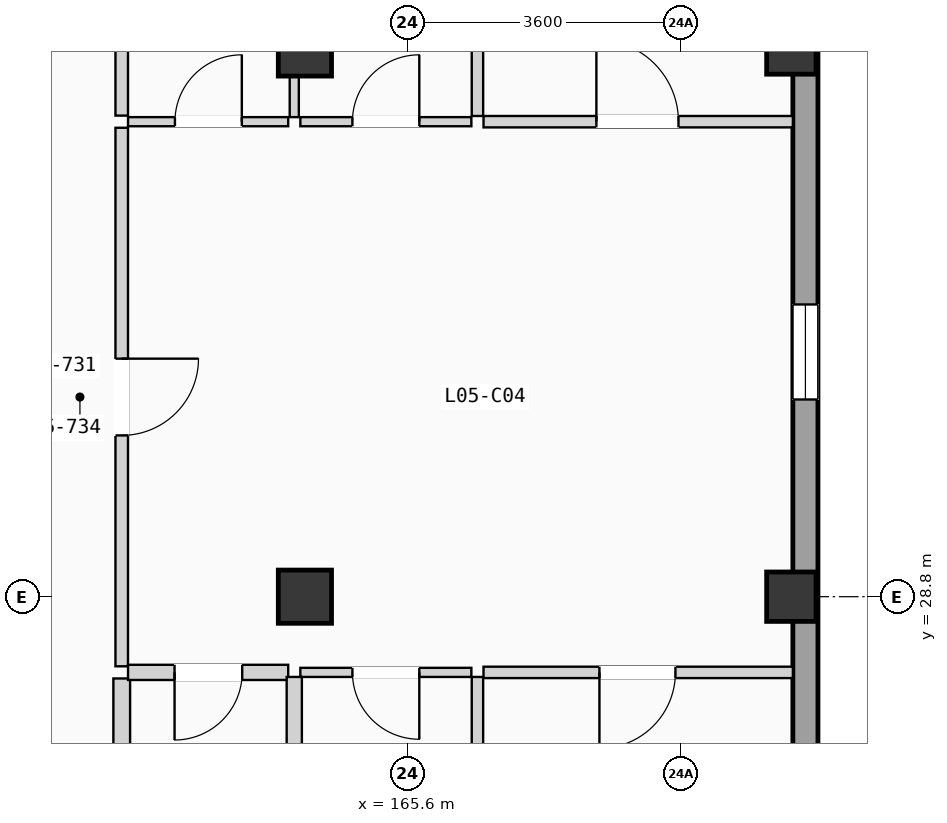
"""IFC4 building model, lengths in metres.
Left out: names, types, materials, properties, quantities, classifications, styles, units other than length and angle.
Written with IfcOpenShell. Run it as: python <this file> out.ifc"""

import sys

from ifc_helpers import new_model, si_unit, direction, frame, frame_2d, origin, origin_2d, place, context, subcontext, project, spatial, rectangle, extrude, element, fill, save


model = new_model("IFC4")
c1 = context("Model", 3, precision=1e-05, world=origin(), true_north=direction((0.0, 1.0)))
c2 = subcontext(c1, "Body", "Model", "MODEL_VIEW")
j1 = project(units=[si_unit("LENGTHUNIT", "METRE"), si_unit("PLANEANGLEUNIT", "RADIAN")], contexts=[c1])
p1 = place(None, origin())
s1 = spatial("IfcSite", under=j1, at=p1, CompositionType="ELEMENT")
p2 = place(p1, origin())
s2 = spatial("IfcBuilding", under=s1, at=p2, CompositionType="ELEMENT")
p3 = place(p2, frame((0.0, 0.0, 18.375)))
s3 = spatial("IfcBuildingStorey", under=s2, at=p3, CompositionType="ELEMENT", Elevation=18.375)
for number, where, z_axis, x_axis in (
    (1, (164.25, 28.8, 0.0), (0.0, 0.0, 1.0), (1.0, 0.0, 0.0)),
    (2, (164.25, 36.0, 0.0), (0.0, 0.0, 1.0), (1.0, 0.0, 0.0)),
):
    element("IfcColumn", number, at=place(p3, frame(where, z_axis=z_axis, x_axis=x_axis)), inside=s3, PredefinedType="COLUMN", context=c2, shape_type="SweptSolid", body=[
        extrude(rectangle(XDim=0.7, YDim=0.7, at=origin_2d()), origin(), (0.0, 0.0, 1.0), 3.15),
    ])
for number, where, z_axis, x_axis in (
    (3, (170.65, 28.8, 0.0), (0.0, 0.0, 1.0), (1.0, 0.0, 0.0)),
    (4, (170.65, 36.0, 0.0), (0.0, 0.0, 1.0), (1.0, 0.0, 0.0)),
):
    element("IfcColumn", number, at=place(p3, frame(where, z_axis=z_axis, x_axis=x_axis)), inside=s3, PredefinedType="COLUMN", context=c2, shape_type="SweptSolid", body=[
        extrude(rectangle(XDim=0.65, YDim=0.65, at=origin_2d()), origin(), (0.0, 0.0, 1.0), 3.15),
    ])
p4 = place(p3, frame((170.835, 0.33, 0.0), z_axis=(0.0, 0.0, 1.0), x_axis=(0.0, 1.0, 0.0)))
e5 = element("IfcWall", 5, at=p4, inside=s3, PredefinedType="SOLIDWALL", context=c2, shape_type="SweptSolid", body=[
    extrude(rectangle(XDim=49.74, YDim=0.33, at=frame_2d((24.87, 0.0))), origin(), (0.0, 0.0, 1.0), 2.89),
])
p5 = place(p4, frame((9.91, 0.0, 0.855)))
e6 = element("IfcOpeningElement", 6, at=p5, cuts=e5, PredefinedType="OPENING", context=c2, shape_type="SweptSolid", body=[
    extrude(rectangle(XDim=1.25, YDim=1.35, at=frame_2d((0.625, 0.675))), frame((0.0, 0.175, 0.0), z_axis=(0.0, -1.0, 0.0), x_axis=(1.0, 0.0, 0.0)), (0.0, 0.0, 1.0), 0.35),
])
p6 = place(p4, frame((16.823, 0.0, 0.705)))
e7 = element("IfcOpeningElement", 7, at=p6, cuts=e5, PredefinedType="OPENING", context=c2, shape_type="SweptSolid", body=[
    extrude(rectangle(XDim=1.25, YDim=1.5, at=frame_2d((0.625, 0.75))), frame((0.0, 0.175, 0.0), z_axis=(0.0, -1.0, 0.0), x_axis=(1.0, 0.0, 0.0)), (0.0, 0.0, 1.0), 0.35),
])
p7 = place(p4, frame((31.065, 0.0, 0.555)))
e8 = element("IfcOpeningElement", 8, at=p7, cuts=e5, PredefinedType="OPENING", context=c2, shape_type="SweptSolid", body=[
    extrude(rectangle(XDim=1.25, YDim=1.65, at=frame_2d((0.625, 0.825))), frame((0.0, 0.175, 0.0), z_axis=(0.0, -1.0, 0.0), x_axis=(1.0, 0.0, 0.0)), (0.0, 0.0, 1.0), 0.35),
])
p8 = place(p4, frame((23.992, 0.0, 0.85)))
e9 = element("IfcOpeningElement", 9, at=p8, cuts=e5, PredefinedType="OPENING", context=c2, shape_type="SweptSolid", body=[
    extrude(rectangle(XDim=0.95, YDim=1.2, at=frame_2d((0.475, 0.6))), frame((0.0, 0.175, 0.0), z_axis=(0.0, -1.0, 0.0), x_axis=(1.0, 0.0, 0.0)), (0.0, 0.0, 1.0), 0.35),
])
p9 = place(p4, frame((38.53, 0.0, 0.9)))
e10 = element("IfcOpeningElement", 10, at=p9, cuts=e5, PredefinedType="OPENING", context=c2, shape_type="SweptSolid", body=[
    extrude(rectangle(XDim=1.35, YDim=1.2, at=frame_2d((0.675, 0.6))), frame((0.0, 0.175, 0.0), z_axis=(0.0, -1.0, 0.0), x_axis=(1.0, 0.0, 0.0)), (0.0, 0.0, 1.0), 0.35),
])
p10 = place(p3, frame((161.84, 27.884, 0.0), z_axis=(0.0, 0.0, 1.0), x_axis=(0.0, 1.0, 0.0)))
e11 = element("IfcWall", 11, at=p10, inside=s3, PredefinedType="PARTITIONING", context=c2, shape_type="SweptSolid", body=[
    extrude(rectangle(XDim=7.086, YDim=0.165, at=frame_2d((3.543, 0.0))), origin(), (0.0, 0.0, 1.0), 2.87),
])
p11 = place(p10, frame((3.038, 0.0, 0.0)))
e12 = element("IfcOpeningElement", 12, at=p11, cuts=e11, PredefinedType="OPENING", context=c2, shape_type="SweptSolid", body=[
    extrude(rectangle(XDim=1.01, YDim=2.11, at=frame_2d((0.505, 1.055))), frame((0.0, 0.093, 0.0), z_axis=(0.0, -1.0, 0.0), x_axis=(1.0, 0.0, 0.0)), (0.0, 0.0, 1.0), 0.185),
])
p12 = place(p3, frame((161.84, 21.066, 0.0), z_axis=(0.0, 0.0, 1.0), x_axis=(0.0, 1.0, 0.0)))
e13 = element("IfcWall", 13, at=p12, inside=s3, PredefinedType="PLUMBINGWALL", context=c2, shape_type="SweptSolid", body=[
    extrude(rectangle(XDim=6.658, YDim=0.22, at=frame_2d((3.329, 0.0))), origin(), (0.0, 0.0, 1.0), 2.87),
])
p13 = place(p3, frame((161.84, 35.13, 0.0), z_axis=(0.0, 0.0, 1.0), x_axis=(0.0, 1.0, 0.0)))
e14 = element("IfcWall", 14, at=p13, inside=s3, PredefinedType="PARTITIONING", context=c2, shape_type="SweptSolid", body=[
    extrude(rectangle(XDim=7.67, YDim=0.165, at=frame_2d((3.835, 0.0))), origin(), (0.0, 0.0, 1.0), 2.87),
])
p14 = place(p3, frame((161.923, 27.804, 0.0), z_axis=(0.0, 0.0, 1.0), x_axis=(1.0, 0.0, 0.0)))
e15 = element("IfcWall", 15, at=p14, inside=s3, PredefinedType="PLUMBINGWALL", context=c2, shape_type="SweptSolid", body=[
    extrude(rectangle(XDim=2.107, YDim=0.2, at=frame_2d((1.053, 0.0))), origin(), (0.0, 0.0, 1.0), 2.87),
])
p15 = place(p14, frame((0.612, 0.0, 0.0)))
e16 = element("IfcOpeningElement", 16, at=p15, cuts=e15, PredefinedType="OPENING", context=c2, shape_type="SweptSolid", body=[
    extrude(rectangle(XDim=0.89, YDim=2.03, at=frame_2d((0.445, 1.015))), frame((0.0, 0.11, 0.0), z_axis=(0.0, -1.0, 0.0), x_axis=(1.0, 0.0, 0.0)), (0.0, 0.0, 1.0), 0.22),
])
p16 = place(p3, frame((161.923, 35.05, 0.0), z_axis=(0.0, 0.0, 1.0), x_axis=(1.0, 0.0, 0.0)))
e17 = element("IfcWall", 17, at=p16, inside=s3, PredefinedType="PARTITIONING", context=c2, shape_type="SweptSolid", body=[
    extrude(rectangle(XDim=2.107, YDim=0.12, at=frame_2d((1.053, 0.0))), origin(), (0.0, 0.0, 1.0), 2.87),
])
p17 = place(p16, frame((0.617, 0.0, 0.0)))
e18 = element("IfcOpeningElement", 18, at=p17, cuts=e17, PredefinedType="OPENING", context=c2, shape_type="SweptSolid", body=[
    extrude(rectangle(XDim=0.88, YDim=2.02, at=frame_2d((0.44, 1.01))), frame((0.0, 0.07, 0.0), z_axis=(0.0, -1.0, 0.0), x_axis=(1.0, 0.0, 0.0)), (0.0, 0.0, 1.0), 0.14),
])
p18 = place(p3, frame((166.6, 27.804, 0.0), z_axis=(0.0, 0.0, 1.0), x_axis=(1.0, 0.0, 0.0)))
e19 = element("IfcWall", 19, at=p18, inside=s3, PredefinedType="PARTITIONING", context=c2, shape_type="SweptSolid", body=[
    extrude(rectangle(XDim=4.07, YDim=0.15, at=frame_2d((2.035, 0.0))), origin(), (0.0, 0.0, 1.0), 2.87),
])
p19 = place(p18, frame((1.525, 0.0, 0.0)))
e20 = element("IfcOpeningElement", 20, at=p19, cuts=e19, PredefinedType="OPENING", context=c2, shape_type="SweptSolid", body=[
    extrude(rectangle(XDim=1.0, YDim=2.06, at=frame_2d((0.5, 1.03))), frame((0.0, 0.085, 0.0), z_axis=(0.0, -1.0, 0.0), x_axis=(1.0, 0.0, 0.0)), (0.0, 0.0, 1.0), 0.17),
])
p20 = place(p3, frame((164.19, 27.804, 0.0), z_axis=(0.0, 0.0, 1.0), x_axis=(1.0, 0.0, 0.0)))
e21 = element("IfcWall", 21, at=p20, inside=s3, PredefinedType="PARTITIONING", context=c2, shape_type="SweptSolid", body=[
    extrude(rectangle(XDim=2.25, YDim=0.12, at=frame_2d((1.125, 0.0))), origin(), (0.0, 0.0, 1.0), 2.87),
])
p21 = place(p20, frame((0.685, 0.0, 0.0)))
e22 = element("IfcOpeningElement", 22, at=p21, cuts=e21, PredefinedType="OPENING", context=c2, shape_type="SweptSolid", body=[
    extrude(rectangle(XDim=0.88, YDim=2.02, at=frame_2d((0.44, 1.01))), frame((0.0, 0.07, 0.0), z_axis=(0.0, -1.0, 0.0), x_axis=(1.0, 0.0, 0.0)), (0.0, 0.0, 1.0), 0.14),
])
p22 = place(p3, frame((166.6, 35.05, 0.0), z_axis=(0.0, 0.0, 1.0), x_axis=(1.0, 0.0, 0.0)))
e23 = element("IfcWall", 23, at=p22, inside=s3, PredefinedType="PARTITIONING", context=c2, shape_type="SweptSolid", body=[
    extrude(rectangle(XDim=4.07, YDim=0.15, at=frame_2d((2.035, 0.0))), origin(), (0.0, 0.0, 1.0), 2.87),
])
p23 = place(p22, frame((1.485, 0.0, 0.0)))
e24 = element("IfcOpeningElement", 24, at=p23, cuts=e23, PredefinedType="OPENING", context=c2, shape_type="SweptSolid", body=[
    extrude(rectangle(XDim=1.08, YDim=2.1, at=frame_2d((0.54, 1.05))), frame((0.0, 0.085, 0.0), z_axis=(0.0, -1.0, 0.0), x_axis=(1.0, 0.0, 0.0)), (0.0, 0.0, 1.0), 0.17),
])
p24 = place(p3, frame((164.19, 35.05, 0.0), z_axis=(0.0, 0.0, 1.0), x_axis=(1.0, 0.0, 0.0)))
e25 = element("IfcWall", 25, at=p24, inside=s3, PredefinedType="PARTITIONING", context=c2, shape_type="SweptSolid", body=[
    extrude(rectangle(XDim=2.25, YDim=0.12, at=frame_2d((1.125, 0.0))), origin(), (0.0, 0.0, 1.0), 2.87),
])
p25 = place(p24, frame((0.685, 0.0, 0.0)))
e26 = element("IfcOpeningElement", 26, at=p25, cuts=e25, PredefinedType="OPENING", context=c2, shape_type="SweptSolid", body=[
    extrude(rectangle(XDim=0.88, YDim=2.02, at=frame_2d((0.44, 1.01))), frame((0.0, 0.07, 0.0), z_axis=(0.0, -1.0, 0.0), x_axis=(1.0, 0.0, 0.0)), (0.0, 0.0, 1.0), 0.14),
])
p26 = place(p3, frame((164.11, 21.066, 0.0), z_axis=(0.0, 0.0, 1.0), x_axis=(0.0, 1.0, 0.0)))
e27 = element("IfcWall", 27, at=p26, inside=s3, PredefinedType="PLUMBINGWALL", context=c2, shape_type="SweptSolid", body=[
    extrude(rectangle(XDim=6.678, YDim=0.2, at=frame_2d((3.339, 0.0))), origin(), (0.0, 0.0, 1.0), 2.87),
])
p27 = place(p26, frame((2.904, 0.0, 0.0)))
e28 = element("IfcOpeningElement", 28, at=p27, cuts=e27, PredefinedType="OPENING", context=c2, shape_type="SweptSolid", body=[
    extrude(rectangle(XDim=0.85, YDim=2.01, at=frame_2d((0.425, 1.005))), frame((0.0, 0.11, 0.0), z_axis=(0.0, -1.0, 0.0), x_axis=(1.0, 0.0, 0.0)), (0.0, 0.0, 1.0), 0.22),
])
p28 = place(p3, frame((164.11, 35.11, 0.0), z_axis=(0.0, 0.0, 1.0), x_axis=(0.0, 1.0, 0.0)))
e29 = element("IfcWall", 29, at=p28, inside=s3, PredefinedType="PARTITIONING", context=c2, shape_type="SweptSolid", body=[
    extrude(rectangle(XDim=7.69, YDim=0.12, at=frame_2d((3.845, 0.0))), origin(), (0.0, 0.0, 1.0), 2.87),
])
p29 = place(p3, frame((166.52, 21.066, 0.0), z_axis=(0.0, 0.0, 1.0), x_axis=(0.0, 1.0, 0.0)))
e30 = element("IfcWall", 30, at=p29, inside=s3, PredefinedType="PARTITIONING", context=c2, shape_type="SweptSolid", body=[
    extrude(rectangle(XDim=6.678, YDim=0.15, at=frame_2d((3.339, 0.0))), origin(), (0.0, 0.0, 1.0), 2.87),
])
p30 = place(p3, frame((166.52, 35.125, 0.0), z_axis=(0.0, 0.0, 1.0), x_axis=(0.0, 1.0, 0.0)))
e31 = element("IfcWall", 31, at=p30, inside=s3, PredefinedType="PARTITIONING", context=c2, shape_type="SweptSolid", body=[
    extrude(rectangle(XDim=7.675, YDim=0.15, at=frame_2d((3.837, 0.0))), origin(), (0.0, 0.0, 1.0), 2.87),
])
p31 = place(p7, origin())
e32 = element("IfcWindow", 32, at=p31, inside=s3, PartitioningType="SINGLE_PANEL", PredefinedType="WINDOW", context=c2, shape_type="SweptSolid", body=[
    extrude(rectangle(XDim=1.25, YDim=1.65, at=frame_2d((0.625, 0.825))), frame((0.0, 0.03, 0.0), z_axis=(0.0, -1.0, 0.0), x_axis=(1.0, 0.0, 0.0)), (0.0, 0.0, 1.0), 0.06),
])
fill(e8, e32)
p32 = place(p11, frame((1.01, 0.0, 0.0), z_axis=(0.0, 0.0, 1.0), x_axis=(-1.0, 0.0, 0.0)))
e33 = element("IfcDoor", 33, at=p32, inside=s3, OperationType="SINGLE_SWING_RIGHT", PredefinedType="DOOR", context=c2, shape_type="SweptSolid", body=[
    extrude(rectangle(XDim=1.01, YDim=2.11, at=frame_2d((0.505, 1.055))), frame((0.0, 0.025, 0.0), z_axis=(0.0, -1.0, 0.0), x_axis=(1.0, 0.0, 0.0)), (0.0, 0.0, 1.0), 0.05),
])
fill(e12, e33)
p33 = place(p15, frame((0.89, 0.0, 0.0), z_axis=(0.0, 0.0, 1.0), x_axis=(-1.0, 0.0, 0.0)))
e34 = element("IfcDoor", 34, at=p33, inside=s3, OperationType="SINGLE_SWING_LEFT", PredefinedType="DOOR", context=c2, shape_type="SweptSolid", body=[
    extrude(rectangle(XDim=0.89, YDim=2.03, at=frame_2d((0.445, 1.015))), frame((0.0, 0.025, 0.0), z_axis=(0.0, -1.0, 0.0), x_axis=(1.0, 0.0, 0.0)), (0.0, 0.0, 1.0), 0.05),
])
fill(e16, e34)
p34 = place(p17, origin())
e35 = element("IfcDoor", 35, at=p34, inside=s3, OperationType="SINGLE_SWING_RIGHT", PredefinedType="DOOR", context=c2, shape_type="SweptSolid", body=[
    extrude(rectangle(XDim=0.88, YDim=2.02, at=frame_2d((0.44, 1.01))), frame((0.0, 0.025, 0.0), z_axis=(0.0, -1.0, 0.0), x_axis=(1.0, 0.0, 0.0)), (0.0, 0.0, 1.0), 0.05),
])
fill(e18, e35)
p35 = place(p19, frame((1.0, 0.0, 0.0), z_axis=(0.0, 0.0, 1.0), x_axis=(-1.0, 0.0, 0.0)))
e36 = element("IfcDoor", 36, at=p35, inside=s3, OperationType="SINGLE_SWING_LEFT", PredefinedType="DOOR", context=c2, shape_type="SweptSolid", body=[
    extrude(rectangle(XDim=1.0, YDim=2.06, at=frame_2d((0.5, 1.03))), frame((0.0, 0.025, 0.0), z_axis=(0.0, -1.0, 0.0), x_axis=(1.0, 0.0, 0.0)), (0.0, 0.0, 1.0), 0.05),
])
fill(e20, e36)
p36 = place(p21, frame((0.88, 0.0, 0.0), z_axis=(0.0, 0.0, 1.0), x_axis=(-1.0, 0.0, 0.0)))
e37 = element("IfcDoor", 37, at=p36, inside=s3, OperationType="SINGLE_SWING_RIGHT", PredefinedType="DOOR", context=c2, shape_type="SweptSolid", body=[
    extrude(rectangle(XDim=0.88, YDim=2.02, at=frame_2d((0.44, 1.01))), frame((0.0, 0.025, 0.0), z_axis=(0.0, -1.0, 0.0), x_axis=(1.0, 0.0, 0.0)), (0.0, 0.0, 1.0), 0.05),
])
fill(e22, e37)
p37 = place(p23, origin())
e38 = element("IfcDoor", 38, at=p37, inside=s3, OperationType="SINGLE_SWING_LEFT", PredefinedType="DOOR", context=c2, shape_type="SweptSolid", body=[
    extrude(rectangle(XDim=1.08, YDim=2.1, at=frame_2d((0.54, 1.05))), frame((0.0, 0.025, 0.0), z_axis=(0.0, -1.0, 0.0), x_axis=(1.0, 0.0, 0.0)), (0.0, 0.0, 1.0), 0.05),
])
fill(e24, e38)
p38 = place(p25, origin())
e39 = element("IfcDoor", 39, at=p38, inside=s3, OperationType="SINGLE_SWING_RIGHT", PredefinedType="DOOR", context=c2, shape_type="SweptSolid", body=[
    extrude(rectangle(XDim=0.88, YDim=2.02, at=frame_2d((0.44, 1.01))), frame((0.0, 0.025, 0.0), z_axis=(0.0, -1.0, 0.0), x_axis=(1.0, 0.0, 0.0)), (0.0, 0.0, 1.0), 0.05),
])
fill(e26, e39)
save(model, sys.argv[1])
